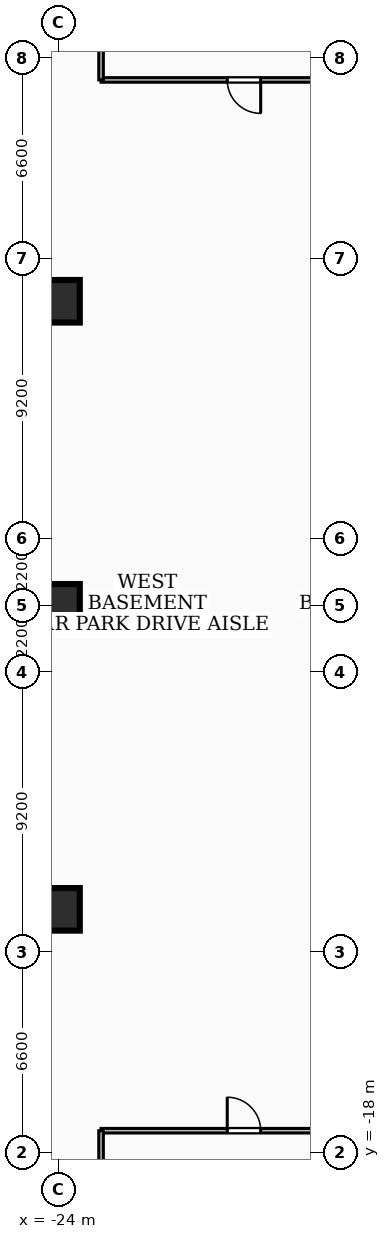
"""IFC4 building model, lengths in metres.
Left out: names, types, materials, properties, quantities, classifications, styles, units other than length and angle.
Written with IfcOpenShell. Run it as: python <this file> out.ifc"""

import sys

from ifc_helpers import new_model, si_unit, direction, frame, frame_2d, origin, origin_2d, place, context, subcontext, project, spatial, rectangle, extrude, element, fill, save


model = new_model("IFC4")
c1 = context("Model", 3, precision=1e-05, world=origin(), true_north=direction((0.0, 1.0)))
c2 = subcontext(c1, "Body", "Model", "MODEL_VIEW")
j1 = project(units=[si_unit("LENGTHUNIT", "METRE"), si_unit("PLANEANGLEUNIT", "RADIAN")], contexts=[c1])
p1 = place(None, origin())
s1 = spatial("IfcSite", under=j1, at=p1, CompositionType="ELEMENT")
p2 = place(p1, origin())
s2 = spatial("IfcBuilding", under=s1, at=p2, CompositionType="ELEMENT")
p3 = place(p2, frame((0.0, 0.0, -9.0)))
s3 = spatial("IfcBuildingStorey", under=s2, at=p3, CompositionType="ELEMENT", Elevation=-9.0)
for number, where, z_axis, x_axis in (
    (1, (-24.0, -10.0, 0.0), (0.0, 0.0, 1.0), (1.0, 0.0, 0.0)),
    (2, (-24.0, 0.0, 0.0), (0.0, 0.0, 1.0), (1.0, 0.0, 0.0)),
    (3, (-24.0, 10.0, 0.0), (0.0, 0.0, 1.0), (1.0, 0.0, 0.0)),
):
    element("IfcColumn", number, at=place(p3, frame(where, z_axis=z_axis, x_axis=x_axis)), inside=s3, PredefinedType="COLUMN", context=c2, shape_type="SweptSolid", body=[
        extrude(rectangle(XDim=1.4, YDim=1.4, at=origin_2d()), origin(), (0.0, 0.0, 1.0), 4.5),
    ])
p4 = place(p3, frame((-22.6, -17.28, 0.0), z_axis=(0.0, 0.0, 1.0), x_axis=(1.0, 0.0, 0.0)))
e4 = element("IfcWall", 4, at=p4, inside=s3, PredefinedType="PARTITIONING", context=c2, shape_type="SweptSolid", body=[
    extrude(rectangle(XDim=9.4, YDim=0.15, at=frame_2d((4.7, 0.0))), origin(), (0.0, 0.0, 1.0), 4.18),
])
p5 = place(p4, frame((4.15, 0.0, 0.0)))
e5 = element("IfcOpeningElement", 5, at=p5, cuts=e4, PredefinedType="OPENING", context=c2, shape_type="SweptSolid", body=[
    extrude(rectangle(XDim=1.1, YDim=2.15, at=frame_2d((0.55, 1.075))), frame((0.0, 0.085, 0.0), z_axis=(0.0, -1.0, 0.0), x_axis=(1.0, 0.0, 0.0)), (0.0, 0.0, 1.0), 0.17),
])
p6 = place(p3, frame((-22.6, -25.8, 0.0), z_axis=(0.0, 0.0, 1.0), x_axis=(0.0, 1.0, 0.0)))
e6 = element("IfcWall", 6, at=p6, inside=s3, PredefinedType="PARTITIONING", context=c2, shape_type="SweptSolid", body=[
    extrude(rectangle(XDim=8.52, YDim=0.15, at=frame_2d((4.26, 0.0))), origin(), (0.0, 0.0, 1.0), 4.18),
])
p7 = place(p3, frame((-13.2, 17.28, 0.0), z_axis=(0.0, 0.0, 1.0), x_axis=(-1.0, 0.0, 0.0)))
e7 = element("IfcWall", 7, at=p7, inside=s3, PredefinedType="PARTITIONING", context=c2, shape_type="SweptSolid", body=[
    extrude(rectangle(XDim=9.4, YDim=0.15, at=frame_2d((4.7, 0.0))), origin(), (0.0, 0.0, 1.0), 4.18),
])
p8 = place(p7, frame((4.15, 0.0, 0.0)))
e8 = element("IfcOpeningElement", 8, at=p8, cuts=e7, PredefinedType="OPENING", context=c2, shape_type="SweptSolid", body=[
    extrude(rectangle(XDim=1.1, YDim=2.15, at=frame_2d((0.55, 1.075))), frame((0.0, 0.085, 0.0), z_axis=(0.0, -1.0, 0.0), x_axis=(1.0, 0.0, 0.0)), (0.0, 0.0, 1.0), 0.17),
])
p9 = place(p3, frame((-22.6, 17.28, 0.0), z_axis=(0.0, 0.0, 1.0), x_axis=(0.0, 1.0, 0.0)))
e9 = element("IfcWall", 9, at=p9, inside=s3, PredefinedType="PARTITIONING", context=c2, shape_type="SweptSolid", body=[
    extrude(rectangle(XDim=8.52, YDim=0.15, at=frame_2d((4.26, 0.0))), origin(), (0.0, 0.0, 1.0), 3.072),
])
p10 = place(p5, origin())
e10 = element("IfcDoor", 10, at=p10, inside=s3, OperationType="SINGLE_SWING_LEFT", PredefinedType="DOOR", context=c2, shape_type="SweptSolid", body=[
    extrude(rectangle(XDim=1.1, YDim=2.15, at=frame_2d((0.55, 1.075))), frame((0.0, 0.025, 0.0), z_axis=(0.0, -1.0, 0.0), x_axis=(1.0, 0.0, 0.0)), (0.0, 0.0, 1.0), 0.05),
])
fill(e5, e10)
p11 = place(p8, origin())
e11 = element("IfcDoor", 11, at=p11, inside=s3, OperationType="SINGLE_SWING_LEFT", PredefinedType="DOOR", context=c2, shape_type="SweptSolid", body=[
    extrude(rectangle(XDim=1.1, YDim=2.15, at=frame_2d((0.55, 1.075))), frame((0.0, 0.025, 0.0), z_axis=(0.0, -1.0, 0.0), x_axis=(1.0, 0.0, 0.0)), (0.0, 0.0, 1.0), 0.05),
])
fill(e8, e11)
save(model, sys.argv[1])
